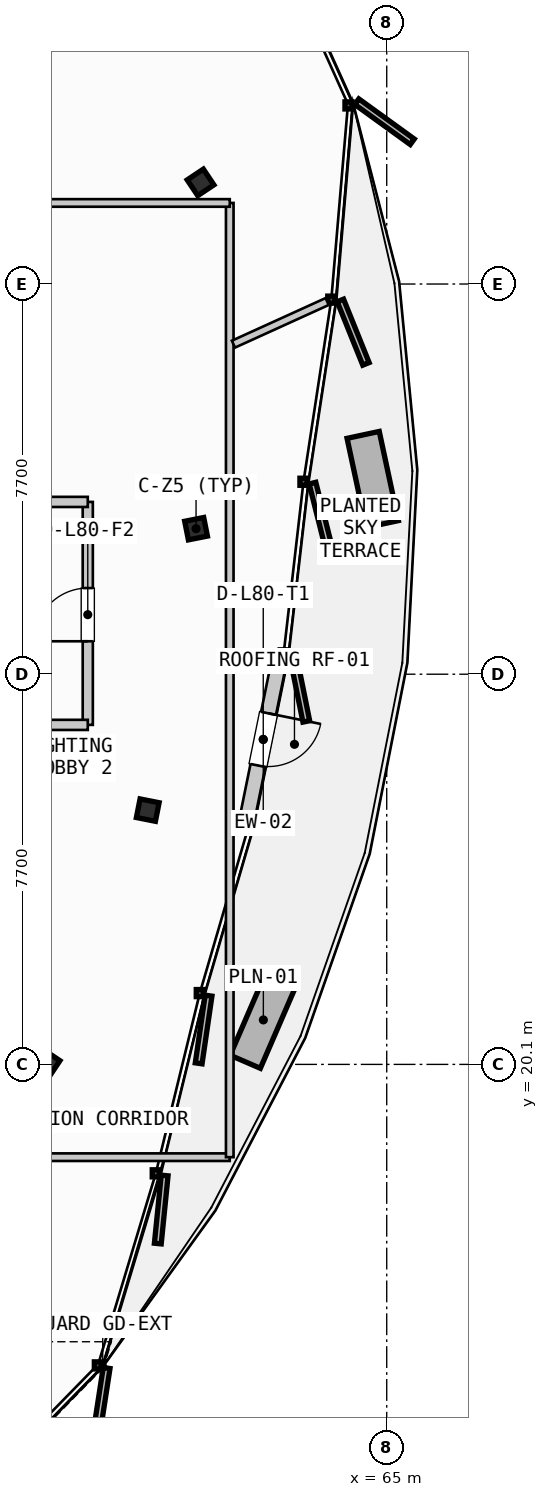
"""IFC4 building model, lengths in metres.
Left out: names, types, materials, properties, quantities, classifications, styles, units other than length and angle.
Written with IfcOpenShell. Run it as: python <this file> out.ifc"""

import sys

from ifc_helpers import new_model, si_unit, direction, frame, frame_2d, origin, origin_2d, place, context, subcontext, project, spatial, rectangle, i_section, extrude, source, transform, mapped, element, fill, save


model = new_model("IFC4")
c1 = context("Model", 3, precision=1e-05, world=origin(), true_north=direction((0.0, 1.0)))
c2 = subcontext(c1, "Body", "Model", "MODEL_VIEW")
j1 = project(units=[si_unit("LENGTHUNIT", "METRE"), si_unit("PLANEANGLEUNIT", "RADIAN")], contexts=[c1])
p1 = place(None, origin())
s1 = spatial("IfcSite", under=j1, at=p1, CompositionType="ELEMENT")
p2 = place(p1, origin())
s2 = spatial("IfcBuilding", under=s1, at=p2, CompositionType="ELEMENT")
p3 = place(p2, frame((0.0, 0.0, 300.85)))
s3 = spatial("IfcBuildingStorey", under=s2, at=p3, CompositionType="ELEMENT", Elevation=300.85)
m1 = source(origin(), c2, "Body", "SweptSolid", [
    extrude(i_section(OverallWidth=0.374, OverallDepth=0.383, WebThickness=0.017, FlangeThickness=0.026, FilletRadius=0.015, at=origin_2d()), origin(), (0.0, 0.0, 1.0), 3.185),
])
for number, where, z_axis, x_axis in (
    (1, (61.237, 30.672, 0.0), (0.0, 0.0, 1.0), (0.981, 0.195, 0.0)),
    (2, (61.326, 37.506, 0.0), (0.0, 0.0, 1.0), (0.831, 0.556, 0.0)),
    (3, (58.287, 20.125, 0.0), (0.0, 0.0, 1.0), (0.831, -0.556, 0.0)),
    (4, (60.284, 25.118, 0.0), (0.0, 0.0, 1.0), (0.981, -0.195, 0.0)),
):
    element("IfcColumn", number, at=place(p3, frame(where, z_axis=z_axis, x_axis=x_axis)), inside=s3, PredefinedType="COLUMN", context=c2, shape_type="MappedRepresentation", body=[
        mapped(m1, transform((0.0, 0.0, 0.0), scale=1.0)),
    ])
p4 = place(p3, frame((62.905, 28.197, 0.0), z_axis=(0.0, 0.0, 1.0), x_axis=(-0.199011946344, -0.979997063879, 0.0)))
e5 = element("IfcWall", 5, at=p4, inside=s3, PredefinedType="SOLIDWALL", context=c2, shape_type="SweptSolid", body=[
    extrude(rectangle(XDim=3.436, YDim=0.3, at=frame_2d((1.718, 0.0))), origin(), (0.0, 0.0, 1.0), 2.71),
])
p5 = place(p4, frame((1.193, 0.0, 0.0)))
e6 = element("IfcOpeningElement", 6, at=p5, cuts=e5, PredefinedType="OPENING", context=c2, shape_type="SweptSolid", body=[
    extrude(rectangle(XDim=1.05, YDim=2.2, at=frame_2d((0.525, 1.1))), frame((0.0, 0.16, 0.0), z_axis=(0.0, -1.0, 0.0), x_axis=(1.0, 0.0, 0.0)), (0.0, 0.0, 1.0), 0.32),
])
p6 = place(p3, frame((59.1, 26.8, 0.0), z_axis=(0.0, 0.0, 1.0), x_axis=(0.0, 1.0, 0.0)))
e7 = element("IfcWall", 7, at=p6, inside=s3, PredefinedType="PARTITIONING", context=c2, shape_type="SweptSolid", body=[
    extrude(rectangle(XDim=4.4, YDim=0.2, at=frame_2d((2.2, 0.0))), origin(), (0.0, 0.0, 1.0), 2.28),
])
p7 = place(p6, frame((1.65, 0.0, 0.0)))
e8 = element("IfcOpeningElement", 8, at=p7, cuts=e7, PredefinedType="OPENING", context=c2, shape_type="SweptSolid", body=[
    extrude(rectangle(XDim=1.05, YDim=2.15, at=frame_2d((0.525, 1.075))), frame((0.0, 0.11, 0.0), z_axis=(0.0, -1.0, 0.0), x_axis=(1.0, 0.0, 0.0)), (0.0, 0.0, 1.0), 0.22),
])
for number, where, z_axis, x_axis in (
    (9, (55.835, 26.8, 0.0), (0.0, 0.0, 1.0), (1.0, 0.0, 0.0)),
    (10, (55.835, 31.2, 0.0), (0.0, 0.0, 1.0), (1.0, 0.0, 0.0)),
):
    element("IfcWall", number, at=place(p3, frame(where, z_axis=z_axis, x_axis=x_axis)), inside=s3, PredefinedType="PARTITIONING", context=c2, shape_type="SweptSolid", body=[
        extrude(rectangle(XDim=3.265, YDim=0.2, at=frame_2d((1.633, 0.0))), origin(), (0.0, 0.0, 1.0), 2.28),
    ])
p8 = place(p3, frame((32.46, 18.269, 0.0), z_axis=(0.0, 0.0, 1.0), x_axis=(1.0, 0.0, 0.0)))
e11 = element("IfcWall", 11, at=p8, inside=s3, PredefinedType="PARTITIONING", context=c2, shape_type="SweptSolid", body=[
    extrude(rectangle(XDim=29.442, YDim=0.15, at=frame_2d((14.721, 0.0))), origin(), (0.0, 0.0, 1.0), 2.28),
])
p9 = place(p8, frame((15.274, 0.0, 0.0)))
e12 = element("IfcOpeningElement", 12, at=p9, cuts=e11, PredefinedType="OPENING", context=c2, shape_type="SweptSolid", body=[
    extrude(rectangle(XDim=0.95, YDim=2.15, at=frame_2d((0.475, 1.075))), frame((0.0, 0.085, 0.0), z_axis=(0.0, -1.0, 0.0), x_axis=(1.0, 0.0, 0.0)), (0.0, 0.0, 1.0), 0.17),
])
p10 = place(p3, frame((61.902, 18.269, 0.0), z_axis=(0.0, 0.0, 1.0), x_axis=(0.0, 1.0, 0.0)))
e13 = element("IfcWall", 13, at=p10, inside=s3, PredefinedType="PARTITIONING", context=c2, shape_type="SweptSolid", body=[
    extrude(rectangle(XDim=18.831, YDim=0.15, at=frame_2d((9.416, 0.0))), origin(), (0.0, 0.0, 1.0), 2.28),
])
p11 = place(p3, frame((61.902, 37.1, 0.0), z_axis=(0.0, 0.0, 1.0), x_axis=(-1.0, 0.0, 0.0)))
e14 = element("IfcWall", 14, at=p11, inside=s3, PredefinedType="PARTITIONING", context=c2, shape_type="SweptSolid", body=[
    extrude(rectangle(XDim=29.442, YDim=0.15, at=frame_2d((14.721, 0.0))), origin(), (0.0, 0.0, 1.0), 2.28),
])
p12 = place(p11, frame((14.246, 0.0, 0.0)))
e15 = element("IfcOpeningElement", 15, at=p12, cuts=e14, PredefinedType="OPENING", context=c2, shape_type="SweptSolid", body=[
    extrude(rectangle(XDim=0.95, YDim=2.15, at=frame_2d((0.475, 1.075))), frame((0.0, 0.085, 0.0), z_axis=(0.0, -1.0, 0.0), x_axis=(1.0, 0.0, 0.0)), (0.0, 0.0, 1.0), 0.17),
])
p13 = place(p3, frame((61.975, 34.313, 0.0), z_axis=(0.0, 0.0, 1.0), x_axis=(0.910329433421, 0.413884431512, 0.0)))
e16 = element("IfcWall", 16, at=p13, inside=s3, PredefinedType="PARTITIONING", context=c2, shape_type="SweptSolid", body=[
    extrude(rectangle(XDim=2.031, YDim=0.15, at=frame_2d((1.016, 0.0))), origin(), (0.0, 0.0, 1.0), 2.28),
])
m2 = source(origin(), c2, "Body", "SweptSolid", [
    extrude(rectangle(XDim=1.05, YDim=2.2, at=frame_2d((0.525, 1.1))), frame((0.0, 0.025, 0.0), z_axis=(0.0, -1.0, 0.0), x_axis=(1.0, 0.0, 0.0)), (0.0, 0.0, 1.0), 0.05),
])
p14 = place(p5, origin())
e17 = element("IfcDoor", 17, at=p14, inside=s3, OperationType="SINGLE_SWING_LEFT", PredefinedType="DOOR", context=c2, shape_type="MappedRepresentation", body=[
    mapped(m2, transform((0.0, 0.0, 0.0), scale=1.0)),
])
fill(e6, e17)
m3 = source(origin(), c2, "Body", "SweptSolid", [
    extrude(rectangle(XDim=1.05, YDim=2.15, at=frame_2d((0.525, 1.075))), frame((0.0, 0.025, 0.0), z_axis=(0.0, -1.0, 0.0), x_axis=(1.0, 0.0, 0.0)), (0.0, 0.0, 1.0), 0.05),
])
p15 = place(p7, origin())
e18 = element("IfcDoor", 18, at=p15, inside=s3, OperationType="SINGLE_SWING_LEFT", PredefinedType="DOOR", context=c2, shape_type="MappedRepresentation", body=[
    mapped(m3, transform((0.0, 0.0, 0.0), scale=1.0)),
])
fill(e8, e18)
save(model, sys.argv[1])
